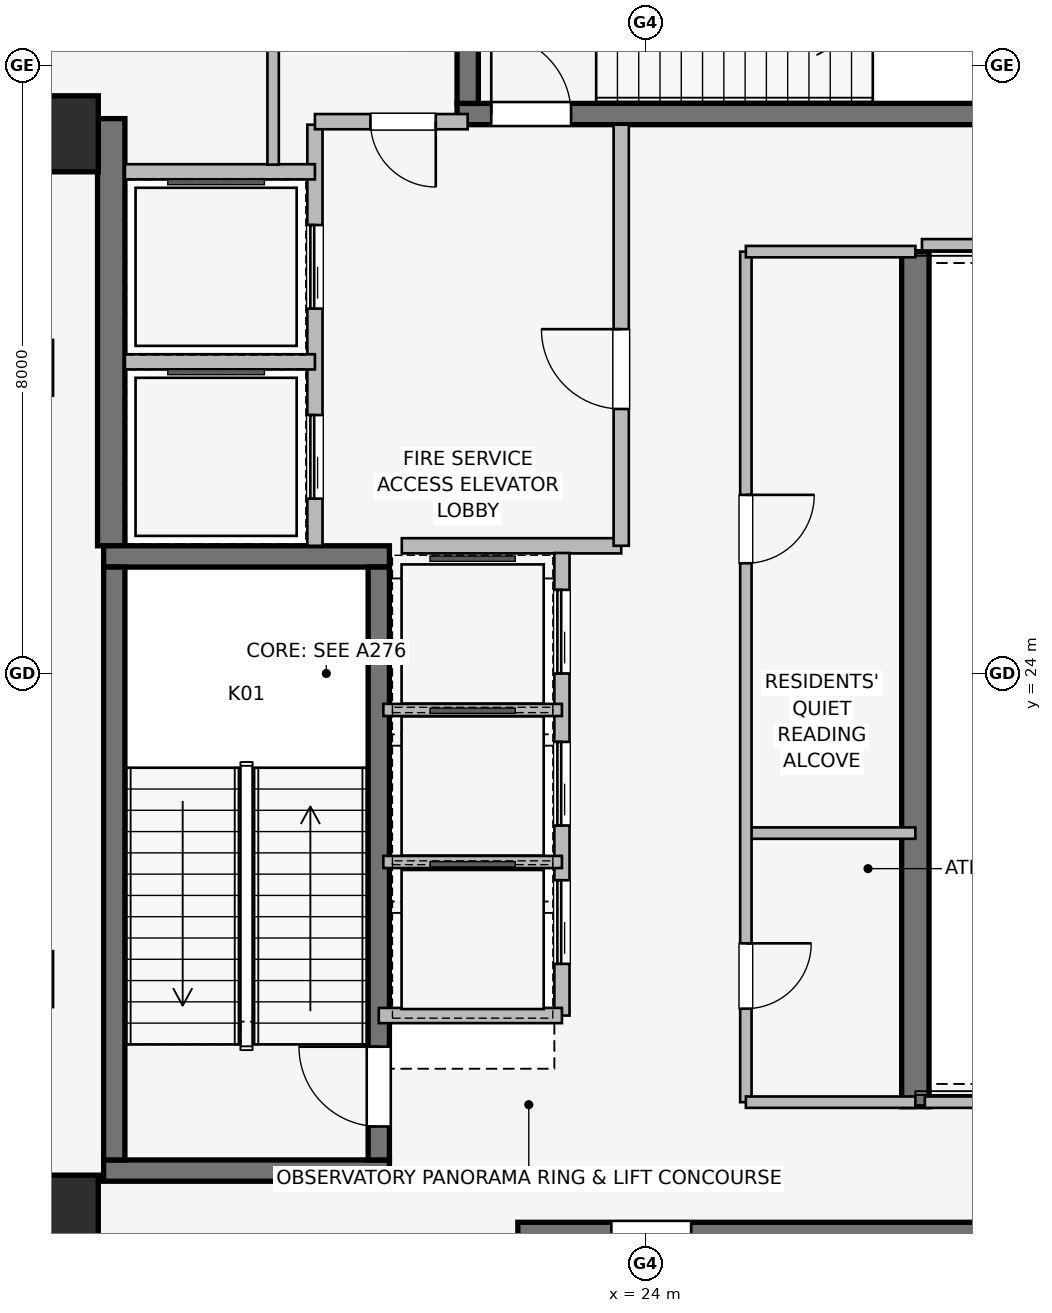
"""IFC4 building model, lengths in metres.
Left out: names, types, materials, properties, quantities, classifications, styles, units other than length and angle.
Written with IfcOpenShell. Run it as: python <this file> out.ifc"""

import sys

from ifc_helpers import new_model, si_unit, direction, frame, frame_2d, origin, origin_2d, place, context, subcontext, project, spatial, rectangle, extrude, element, fill, save


model = new_model("IFC4")
c1 = context("Model", 3, precision=1e-05, world=origin(), true_north=direction((0.0, 1.0)))
c2 = subcontext(c1, "Body", "Model", "MODEL_VIEW")
j1 = project(units=[si_unit("LENGTHUNIT", "METRE"), si_unit("PLANEANGLEUNIT", "RADIAN")], contexts=[c1])
p1 = place(None, origin())
s1 = spatial("IfcSite", under=j1, at=p1, CompositionType="ELEMENT")
p2 = place(p1, origin())
s2 = spatial("IfcBuilding", under=s1, at=p2, CompositionType="ELEMENT")
p3 = place(p2, frame((0.0, 0.0, 270.3)))
s3 = spatial("IfcBuildingStorey", under=s2, at=p3, CompositionType="ELEMENT", Elevation=270.3)
p4 = place(p3, frame((16.97, 25.68, 0.0), z_axis=(0.0, 0.0, 1.0), x_axis=(0.0, 1.0, 0.0)))
e1 = element("IfcWall", 1, at=p4, inside=s3, PredefinedType="SHEAR", context=c2, shape_type="SweptSolid", body=[
    extrude(rectangle(XDim=5.62, YDim=0.36, at=frame_2d((2.81, 0.0))), origin(), (0.0, 0.0, 1.0), 4.8),
])
p5 = place(p3, frame((27.55, 29.55, 0.0), z_axis=(0.0, 0.0, 1.0), x_axis=(0.0, -1.0, 0.0)))
e2 = element("IfcWall", 2, at=p5, inside=s3, PredefinedType="SHEAR", context=c2, shape_type="SweptSolid", body=[
    extrude(rectangle(XDim=11.25, YDim=0.36, at=frame_2d((5.625, 0.0))), origin(), (0.0, 0.0, 1.0), 4.8),
])
for number, where, z_axis, x_axis in (
    (3, (16.87, 17.46, 0.0), (0.0, 0.0, 1.0), (1.0, 0.0, 0.0)),
    (4, (20.63, 25.54, 0.0), (0.0, 0.0, 1.0), (-1.0, 0.0, 0.0)),
):
    element("IfcWall", number, at=place(p3, frame(where, z_axis=z_axis, x_axis=x_axis)), inside=s3, PredefinedType="SHEAR", context=c2, shape_type="SweptSolid", body=[
        extrude(rectangle(XDim=3.76, YDim=0.28, at=frame_2d((1.88, 0.0))), origin(), (0.0, 0.0, 1.0), 4.8),
    ])
p6 = place(p3, frame((17.01, 25.4, 0.0), z_axis=(0.0, 0.0, 1.0), x_axis=(0.0, -1.0, 0.0)))
e5 = element("IfcWall", 5, at=p6, inside=s3, PredefinedType="SHEAR", context=c2, shape_type="SweptSolid", body=[
    extrude(rectangle(XDim=7.8, YDim=0.28, at=frame_2d((3.9, 0.0))), origin(), (0.0, 0.0, 1.0), 4.8),
])
p7 = place(p3, frame((20.49, 17.6, 0.0), z_axis=(0.0, 0.0, 1.0), x_axis=(0.0, 1.0, 0.0)))
e6 = element("IfcWall", 6, at=p7, inside=s3, PredefinedType="SHEAR", context=c2, shape_type="SweptSolid", body=[
    extrude(rectangle(XDim=7.8, YDim=0.28, at=frame_2d((3.9, 0.0))), origin(), (0.0, 0.0, 1.0), 4.8),
])
p8 = place(p7, frame((0.44, 0.0, 0.0)))
e7 = element("IfcOpeningElement", 7, at=p8, cuts=e6, PredefinedType="OPENING", context=c2, shape_type="SweptSolid", body=[
    extrude(rectangle(XDim=1.05, YDim=2.0, at=frame_2d((0.525, 1.0))), frame((0.0, 0.15, 0.0), z_axis=(0.0, -1.0, 0.0), x_axis=(1.0, 0.0, 0.0)), (0.0, 0.0, 1.0), 0.3),
])
p9 = place(p3, frame((30.68, 16.64, 0.0), z_axis=(0.0, 0.0, 1.0), x_axis=(-1.0, 0.0, 0.0)))
e8 = element("IfcWall", 8, at=p9, inside=s3, PredefinedType="SHEAR", context=c2, shape_type="SweptSolid", body=[
    extrude(rectangle(XDim=8.36, YDim=0.28, at=frame_2d((4.18, 0.0))), origin(), (0.0, 0.0, 1.0), 4.8),
])
p10 = place(p9, frame((6.08, 0.0, 0.0)))
e9 = element("IfcOpeningElement", 9, at=p10, cuts=e8, PredefinedType="OPENING", context=c2, shape_type="SweptSolid", body=[
    extrude(rectangle(XDim=1.05, YDim=2.0, at=frame_2d((0.525, 1.0))), frame((0.0, 0.15, 0.0), z_axis=(0.0, -1.0, 0.0), x_axis=(1.0, 0.0, 0.0)), (0.0, 0.0, 1.0), 0.3),
])
p11 = place(p3, frame((21.52, 31.36, 0.0), z_axis=(0.0, 0.0, 1.0), x_axis=(1.0, 0.0, 0.0)))
e10 = element("IfcWall", 10, at=p11, inside=s3, PredefinedType="SHEAR", context=c2, shape_type="SweptSolid", body=[
    extrude(rectangle(XDim=8.36, YDim=0.28, at=frame_2d((4.18, 0.0))), origin(), (0.0, 0.0, 1.0), 4.8),
])
p12 = place(p11, frame((0.45, 0.0, 0.0)))
e11 = element("IfcOpeningElement", 11, at=p12, cuts=e10, PredefinedType="OPENING", context=c2, shape_type="SweptSolid", body=[
    extrude(rectangle(XDim=1.05, YDim=2.0, at=frame_2d((0.525, 1.0))), frame((0.0, 0.15, 0.0), z_axis=(0.0, -1.0, 0.0), x_axis=(1.0, 0.0, 0.0)), (0.0, 0.0, 1.0), 0.3),
])
p13 = place(p3, frame((21.66, 34.7, 0.0), z_axis=(0.0, 0.0, 1.0), x_axis=(0.0, -1.0, 0.0)))
e12 = element("IfcWall", 12, at=p13, inside=s3, PredefinedType="SHEAR", context=c2, shape_type="SweptSolid", body=[
    extrude(rectangle(XDim=3.2, YDim=0.28, at=frame_2d((1.6, 0.0))), origin(), (0.0, 0.0, 1.0), 4.8),
])
for number, where, z_axis, x_axis in (
    (13, (16.3, 16.9, 0.0), (0.0, 0.0, 1.0), (1.0, 0.0, 0.0)),
    (14, (16.3, 31.1, 0.0), (0.0, 0.0, 1.0), (1.0, 0.0, 0.0)),
):
    element("IfcColumn", number, at=place(p3, frame(where, z_axis=z_axis, x_axis=x_axis)), inside=s3, PredefinedType="COLUMN", context=c2, shape_type="SweptSolid", body=[
        extrude(rectangle(XDim=1.0, YDim=1.0, at=origin_2d()), origin(), (0.0, 0.0, 1.0), 4.8),
    ])
p14 = place(p3, frame((15.574, 32.082, 0.0), z_axis=(0.0, 0.0, 1.0), x_axis=(0.520325409202, 0.853968072318, 0.0)))
e15 = element("IfcWall", 15, at=p14, inside=s3, PredefinedType="STANDARD", context=c2, shape_type="SweptSolid", body=[
    extrude(rectangle(XDim=1.678, YDim=0.33, at=frame_2d((0.839, 0.0))), origin(), (0.0, 0.0, 1.0), 4.49),
])
p15 = place(p3, frame((19.65, 25.68, 0.0), z_axis=(0.0, 0.0, 1.0), x_axis=(0.0, 1.0, 0.0)))
e16 = element("IfcWall", 16, at=p15, inside=s3, PredefinedType="PARTITIONING", context=c2, shape_type="SweptSolid", body=[
    extrude(rectangle(XDim=5.54, YDim=0.2, at=frame_2d((2.77, 0.0))), origin(), (0.0, 0.0, 1.0), 4.49),
])
p16 = place(p15, frame((0.62, 0.0, 0.0)))
e17 = element("IfcOpeningElement", 17, at=p16, cuts=e16, PredefinedType="OPENING", context=c2, shape_type="SweptSolid", body=[
    extrude(rectangle(XDim=1.1, YDim=2.2, at=frame_2d((0.55, 1.1))), frame((0.0, 0.11, 0.0), z_axis=(0.0, -1.0, 0.0), x_axis=(1.0, 0.0, 0.0)), (0.0, 0.0, 1.0), 0.22),
])
p17 = place(p15, frame((3.12, 0.0, 0.0)))
e18 = element("IfcOpeningElement", 18, at=p17, cuts=e16, PredefinedType="OPENING", context=c2, shape_type="SweptSolid", body=[
    extrude(rectangle(XDim=1.1, YDim=2.2, at=frame_2d((0.55, 1.1))), frame((0.0, 0.11, 0.0), z_axis=(0.0, -1.0, 0.0), x_axis=(1.0, 0.0, 0.0)), (0.0, 0.0, 1.0), 0.22),
])
p18 = place(p3, frame((20.793, 25.68, 0.0), z_axis=(0.0, 0.0, 1.0), x_axis=(1.0, 0.0, 0.0)))
e19 = element("IfcWall", 19, at=p18, inside=s3, PredefinedType="PARTITIONING", context=c2, shape_type="SweptSolid", body=[
    extrude(rectangle(XDim=2.887, YDim=0.2, at=frame_2d((1.443, 0.0))), origin(), (0.0, 0.0, 1.0), 4.49),
])
p19 = place(p3, frame((23.68, 25.68, 0.0), z_axis=(0.0, 0.0, 1.0), x_axis=(0.0, 1.0, 0.0)))
e20 = element("IfcWall", 20, at=p19, inside=s3, PredefinedType="PARTITIONING", context=c2, shape_type="SweptSolid", body=[
    extrude(rectangle(XDim=5.54, YDim=0.2, at=frame_2d((2.77, 0.0))), origin(), (0.0, 0.0, 1.0), 4.49),
])
p20 = place(p19, frame((1.8, 0.0, 0.0)))
e21 = element("IfcOpeningElement", 21, at=p20, cuts=e20, PredefinedType="OPENING", context=c2, shape_type="SweptSolid", body=[
    extrude(rectangle(XDim=1.05, YDim=2.0, at=frame_2d((0.525, 1.0))), frame((0.0, 0.11, 0.0), z_axis=(0.0, -1.0, 0.0), x_axis=(1.0, 0.0, 0.0)), (0.0, 0.0, 1.0), 0.22),
])
p21 = place(p3, frame((21.66, 31.26, 0.0), z_axis=(0.0, 0.0, 1.0), x_axis=(-1.0, 0.0, 0.0)))
e22 = element("IfcWall", 22, at=p21, inside=s3, PredefinedType="PARTITIONING", context=c2, shape_type="SweptSolid", body=[
    extrude(rectangle(XDim=2.01, YDim=0.2, at=frame_2d((1.005, 0.0))), origin(), (0.0, 0.0, 1.0), 4.49),
])
p22 = place(p21, frame((0.42, 0.0, 0.0)))
e23 = element("IfcOpeningElement", 23, at=p22, cuts=e22, PredefinedType="OPENING", context=c2, shape_type="SweptSolid", body=[
    extrude(rectangle(XDim=0.86, YDim=2.0, at=frame_2d((0.43, 1.0))), frame((0.0, 0.11, 0.0), z_axis=(0.0, -1.0, 0.0), x_axis=(1.0, 0.0, 0.0)), (0.0, 0.0, 1.0), 0.22),
])
p23 = place(p3, frame((17.15, 28.1, 0.0), z_axis=(0.0, 0.0, 1.0), x_axis=(1.0, 0.0, 0.0)))
e24 = element("IfcWall", 24, at=p23, inside=s3, PredefinedType="PARTITIONING", context=c2, shape_type="SweptSolid", body=[
    extrude(rectangle(XDim=2.5, YDim=0.2, at=frame_2d((1.25, 0.0))), origin(), (0.0, 0.0, 1.0), 4.49),
])
p24 = place(p3, frame((19.65, 30.6, 0.0), z_axis=(0.0, 0.0, 1.0), x_axis=(-1.0, 0.0, 0.0)))
e25 = element("IfcWall", 25, at=p24, inside=s3, PredefinedType="PARTITIONING", context=c2, shape_type="SweptSolid", body=[
    extrude(rectangle(XDim=2.5, YDim=0.2, at=frame_2d((1.25, 0.0))), origin(), (0.0, 0.0, 1.0), 3.39),
])
p25 = place(p3, frame((22.9, 19.5, 0.0), z_axis=(0.0, 0.0, 1.0), x_axis=(0.0, 1.0, 0.0)))
e26 = element("IfcWall", 26, at=p25, inside=s3, PredefinedType="PARTITIONING", context=c2, shape_type="SweptSolid", body=[
    extrude(rectangle(XDim=6.085, YDim=0.2, at=frame_2d((3.042, 0.0))), origin(), (0.0, 0.0, 1.0), 4.49),
])
p26 = place(p25, frame((0.68, 0.0, 0.0)))
e27 = element("IfcOpeningElement", 27, at=p26, cuts=e26, PredefinedType="OPENING", context=c2, shape_type="SweptSolid", body=[
    extrude(rectangle(XDim=1.1, YDim=2.2, at=frame_2d((0.55, 1.1))), frame((0.0, 0.11, 0.0), z_axis=(0.0, -1.0, 0.0), x_axis=(1.0, 0.0, 0.0)), (0.0, 0.0, 1.0), 0.22),
])
p27 = place(p25, frame((2.5, 0.0, 0.0)))
e28 = element("IfcOpeningElement", 28, at=p27, cuts=e26, PredefinedType="OPENING", context=c2, shape_type="SweptSolid", body=[
    extrude(rectangle(XDim=1.1, YDim=2.2, at=frame_2d((0.55, 1.1))), frame((0.0, 0.11, 0.0), z_axis=(0.0, -1.0, 0.0), x_axis=(1.0, 0.0, 0.0)), (0.0, 0.0, 1.0), 0.22),
])
p28 = place(p25, frame((4.5, 0.0, 0.0)))
e29 = element("IfcOpeningElement", 29, at=p28, cuts=e26, PredefinedType="OPENING", context=c2, shape_type="SweptSolid", body=[
    extrude(rectangle(XDim=1.1, YDim=2.2, at=frame_2d((0.55, 1.1))), frame((0.0, 0.11, 0.0), z_axis=(0.0, -1.0, 0.0), x_axis=(1.0, 0.0, 0.0)), (0.0, 0.0, 1.0), 0.22),
])
p29 = place(p3, frame((20.49, 19.5, 0.0), z_axis=(0.0, 0.0, 1.0), x_axis=(1.0, 0.0, 0.0)))
e30 = element("IfcWall", 30, at=p29, inside=s3, PredefinedType="PARTITIONING", context=c2, shape_type="SweptSolid", body=[
    extrude(rectangle(XDim=2.41, YDim=0.2, at=frame_2d((1.205, 0.0))), origin(), (0.0, 0.0, 1.0), 3.39),
])
for number, where, z_axis, x_axis in (
    (31, (20.55, 21.52, 0.0), (0.0, 0.0, 1.0), (1.0, 0.0, 0.0)),
    (32, (20.55, 23.52, 0.0), (0.0, 0.0, 1.0), (1.0, 0.0, 0.0)),
):
    element("IfcWall", number, at=place(p3, frame(where, z_axis=z_axis, x_axis=x_axis)), inside=s3, PredefinedType="PARTITIONING", context=c2, shape_type="SweptSolid", body=[
        extrude(rectangle(XDim=2.35, YDim=0.16, at=frame_2d((1.175, 0.0))), origin(), (0.0, 0.0, 1.0), 4.49),
    ])
p30 = place(p3, frame((25.32, 21.9, 0.0), z_axis=(0.0, 0.0, 1.0), x_axis=(1.0, 0.0, 0.0)))
e33 = element("IfcWall", 33, at=p30, inside=s3, PredefinedType="PARTITIONING", context=c2, shape_type="SweptSolid", body=[
    extrude(rectangle(XDim=2.23, YDim=0.15, at=frame_2d((1.115, 0.0))), origin(), (0.0, 0.0, 1.0), 4.49),
])
p31 = place(p3, frame((25.32, 29.55, 0.0), z_axis=(0.0, 0.0, 1.0), x_axis=(0.0, -1.0, 0.0)))
e34 = element("IfcWall", 34, at=p31, inside=s3, PredefinedType="PARTITIONING", context=c2, shape_type="SweptSolid", body=[
    extrude(rectangle(XDim=11.19, YDim=0.15, at=frame_2d((5.595, 0.0))), origin(), (0.0, 0.0, 1.0), 4.49),
])
p32 = place(p31, frame((3.2, 0.0, 0.0)))
e35 = element("IfcOpeningElement", 35, at=p32, cuts=e34, PredefinedType="OPENING", context=c2, shape_type="SweptSolid", body=[
    extrude(rectangle(XDim=0.9, YDim=2.0, at=frame_2d((0.45, 1.0))), frame((0.0, 0.085, 0.0), z_axis=(0.0, -1.0, 0.0), x_axis=(1.0, 0.0, 0.0)), (0.0, 0.0, 1.0), 0.17),
])
p33 = place(p31, frame((9.1, 0.0, 0.0)))
e36 = element("IfcOpeningElement", 36, at=p33, cuts=e34, PredefinedType="OPENING", context=c2, shape_type="SweptSolid", body=[
    extrude(rectangle(XDim=0.86, YDim=2.0, at=frame_2d((0.43, 1.0))), frame((0.0, 0.085, 0.0), z_axis=(0.0, -1.0, 0.0), x_axis=(1.0, 0.0, 0.0)), (0.0, 0.0, 1.0), 0.17),
])
p34 = place(p3, frame((25.32, 18.36, 0.0), z_axis=(0.0, 0.0, 1.0), x_axis=(1.0, 0.0, 0.0)))
e37 = element("IfcWall", 37, at=p34, inside=s3, PredefinedType="PARTITIONING", context=c2, shape_type="SweptSolid", body=[
    extrude(rectangle(XDim=2.23, YDim=0.15, at=frame_2d((1.115, 0.0))), origin(), (0.0, 0.0, 1.0), 4.49),
])
p35 = place(p3, frame((27.55, 29.55, 0.0), z_axis=(0.0, 0.0, 1.0), x_axis=(-1.0, 0.0, 0.0)))
e38 = element("IfcWall", 38, at=p35, inside=s3, PredefinedType="PARTITIONING", context=c2, shape_type="SweptSolid", body=[
    extrude(rectangle(XDim=2.23, YDim=0.15, at=frame_2d((1.115, 0.0))), origin(), (0.0, 0.0, 1.0), 3.39),
])
p36 = place(p3, frame((19.1, 33.35, 0.0), z_axis=(0.0, 0.0, 1.0), x_axis=(0.0, -1.0, 0.0)))
e39 = element("IfcWall", 39, at=p36, inside=s3, PredefinedType="PARTITIONING", context=c2, shape_type="SweptSolid", body=[
    extrude(rectangle(XDim=2.655, YDim=0.15, at=frame_2d((1.328, 0.0))), origin(), (0.0, 0.0, 1.0), 4.49),
])
p37 = place(p3, frame((27.675, 18.36, 0.0), z_axis=(0.0, 0.0, 1.0), x_axis=(1.0, 0.0, 0.0)))
e40 = element("IfcWall", 40, at=p37, inside=s3, PredefinedType="PARTITIONING", context=c2, shape_type="SweptSolid", body=[
    extrude(rectangle(XDim=12.165, YDim=0.15, at=frame_2d((6.083, 0.0))), origin(), (0.0, 0.0, 1.0), 3.631),
])
p38 = place(p3, frame((39.84, 29.64, 0.0), z_axis=(0.0, 0.0, 1.0), x_axis=(-1.0, 0.0, 0.0)))
e41 = element("IfcWall", 41, at=p38, inside=s3, PredefinedType="PARTITIONING", context=c2, shape_type="SweptSolid", body=[
    extrude(rectangle(XDim=12.203, YDim=0.15, at=frame_2d((6.102, 0.0))), origin(), (0.0, 0.0, 1.0), 3.631),
])
p39 = place(p8, origin())
e42 = element("IfcDoor", 42, at=p39, inside=s3, OperationType="SINGLE_SWING_RIGHT", PredefinedType="DOOR", context=c2, shape_type="SweptSolid", body=[
    extrude(rectangle(XDim=1.05, YDim=2.0, at=frame_2d((0.525, 1.0))), frame((0.0, 0.025, 0.0), z_axis=(0.0, -1.0, 0.0), x_axis=(1.0, 0.0, 0.0)), (0.0, 0.0, 1.0), 0.05),
])
fill(e7, e42)
p40 = place(p10, origin())
e43 = element("IfcDoor", 43, at=p40, inside=s3, OperationType="SINGLE_SWING_RIGHT", PredefinedType="DOOR", context=c2, shape_type="SweptSolid", body=[
    extrude(rectangle(XDim=1.05, YDim=2.0, at=frame_2d((0.525, 1.0))), frame((0.0, 0.025, 0.0), z_axis=(0.0, -1.0, 0.0), x_axis=(1.0, 0.0, 0.0)), (0.0, 0.0, 1.0), 0.05),
])
fill(e9, e43)
p41 = place(p12, origin())
e44 = element("IfcDoor", 44, at=p41, inside=s3, OperationType="SINGLE_SWING_LEFT", PredefinedType="DOOR", context=c2, shape_type="SweptSolid", body=[
    extrude(rectangle(XDim=1.05, YDim=2.0, at=frame_2d((0.525, 1.0))), frame((0.0, 0.025, 0.0), z_axis=(0.0, -1.0, 0.0), x_axis=(1.0, 0.0, 0.0)), (0.0, 0.0, 1.0), 0.05),
])
fill(e11, e44)
p42 = place(p16, origin())
e45 = element("IfcDoor", 45, at=p42, inside=s3, OperationType="SLIDING_TO_LEFT", PredefinedType="DOOR", context=c2, shape_type="SweptSolid", body=[
    extrude(rectangle(XDim=1.1, YDim=2.2, at=frame_2d((0.55, 1.1))), frame((0.0, 0.025, 0.0), z_axis=(0.0, -1.0, 0.0), x_axis=(1.0, 0.0, 0.0)), (0.0, 0.0, 1.0), 0.05),
])
fill(e17, e45)
p43 = place(p17, origin())
e46 = element("IfcDoor", 46, at=p43, inside=s3, OperationType="SLIDING_TO_LEFT", PredefinedType="DOOR", context=c2, shape_type="SweptSolid", body=[
    extrude(rectangle(XDim=1.1, YDim=2.2, at=frame_2d((0.55, 1.1))), frame((0.0, 0.025, 0.0), z_axis=(0.0, -1.0, 0.0), x_axis=(1.0, 0.0, 0.0)), (0.0, 0.0, 1.0), 0.05),
])
fill(e18, e46)
p44 = place(p20, origin())
e47 = element("IfcDoor", 47, at=p44, inside=s3, OperationType="SINGLE_SWING_RIGHT", PredefinedType="DOOR", context=c2, shape_type="SweptSolid", body=[
    extrude(rectangle(XDim=1.05, YDim=2.0, at=frame_2d((0.525, 1.0))), frame((0.0, 0.025, 0.0), z_axis=(0.0, -1.0, 0.0), x_axis=(1.0, 0.0, 0.0)), (0.0, 0.0, 1.0), 0.05),
])
fill(e21, e47)
p45 = place(p22, origin())
e48 = element("IfcDoor", 48, at=p45, inside=s3, OperationType="SINGLE_SWING_LEFT", PredefinedType="DOOR", context=c2, shape_type="SweptSolid", body=[
    extrude(rectangle(XDim=0.86, YDim=2.0, at=frame_2d((0.43, 1.0))), frame((0.0, 0.025, 0.0), z_axis=(0.0, -1.0, 0.0), x_axis=(1.0, 0.0, 0.0)), (0.0, 0.0, 1.0), 0.05),
])
fill(e23, e48)
p46 = place(p26, origin())
e49 = element("IfcDoor", 49, at=p46, inside=s3, OperationType="SLIDING_TO_LEFT", PredefinedType="DOOR", context=c2, shape_type="SweptSolid", body=[
    extrude(rectangle(XDim=1.1, YDim=2.2, at=frame_2d((0.55, 1.1))), frame((0.0, 0.025, 0.0), z_axis=(0.0, -1.0, 0.0), x_axis=(1.0, 0.0, 0.0)), (0.0, 0.0, 1.0), 0.05),
])
fill(e27, e49)
p47 = place(p27, origin())
e50 = element("IfcDoor", 50, at=p47, inside=s3, OperationType="SLIDING_TO_LEFT", PredefinedType="DOOR", context=c2, shape_type="SweptSolid", body=[
    extrude(rectangle(XDim=1.1, YDim=2.2, at=frame_2d((0.55, 1.1))), frame((0.0, 0.025, 0.0), z_axis=(0.0, -1.0, 0.0), x_axis=(1.0, 0.0, 0.0)), (0.0, 0.0, 1.0), 0.05),
])
fill(e28, e50)
p48 = place(p28, origin())
e51 = element("IfcDoor", 51, at=p48, inside=s3, OperationType="SLIDING_TO_LEFT", PredefinedType="DOOR", context=c2, shape_type="SweptSolid", body=[
    extrude(rectangle(XDim=1.1, YDim=2.2, at=frame_2d((0.55, 1.1))), frame((0.0, 0.025, 0.0), z_axis=(0.0, -1.0, 0.0), x_axis=(1.0, 0.0, 0.0)), (0.0, 0.0, 1.0), 0.05),
])
fill(e29, e51)
p49 = place(p32, origin())
e52 = element("IfcDoor", 52, at=p49, inside=s3, OperationType="SINGLE_SWING_LEFT", PredefinedType="DOOR", context=c2, shape_type="SweptSolid", body=[
    extrude(rectangle(XDim=0.9, YDim=2.0, at=frame_2d((0.45, 1.0))), frame((0.0, 0.025, 0.0), z_axis=(0.0, -1.0, 0.0), x_axis=(1.0, 0.0, 0.0)), (0.0, 0.0, 1.0), 0.05),
])
fill(e35, e52)
p50 = place(p33, origin())
e53 = element("IfcDoor", 53, at=p50, inside=s3, OperationType="SINGLE_SWING_LEFT", PredefinedType="DOOR", context=c2, shape_type="SweptSolid", body=[
    extrude(rectangle(XDim=0.86, YDim=2.0, at=frame_2d((0.43, 1.0))), frame((0.0, 0.025, 0.0), z_axis=(0.0, -1.0, 0.0), x_axis=(1.0, 0.0, 0.0)), (0.0, 0.0, 1.0), 0.05),
])
fill(e36, e53)
save(model, sys.argv[1])
